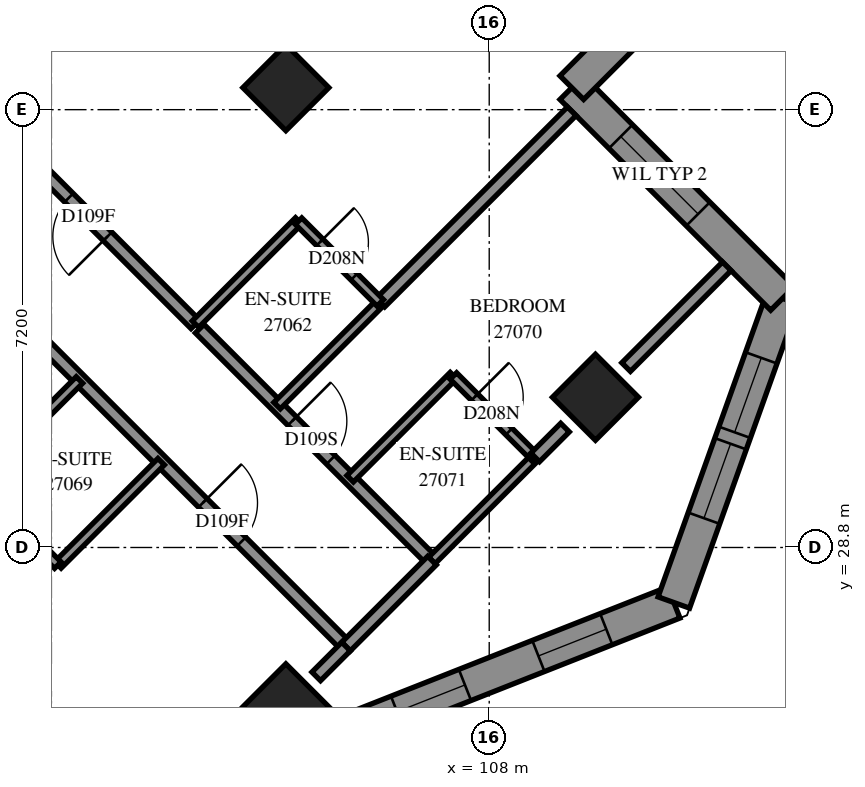
"""IFC4 building model, lengths in metres.
Left out: names, types, materials, properties, quantities, classifications, styles, units other than length and angle.
Written with IfcOpenShell. Run it as: python <this file> out.ifc"""

import sys

from ifc_helpers import new_model, si_unit, direction, frame, frame_2d, origin, origin_2d, place, context, subcontext, project, spatial, polyline, rectangle, outline, extrude, element, fill, save


model = new_model("IFC4")
c1 = context("Model", 3, precision=1e-05, world=origin(), true_north=direction((0.0, 1.0)))
c2 = subcontext(c1, "Body", "Model", "MODEL_VIEW")
j1 = project(units=[si_unit("LENGTHUNIT", "METRE"), si_unit("PLANEANGLEUNIT", "RADIAN")], contexts=[c1])
p1 = place(None, origin())
s1 = spatial("IfcSite", under=j1, at=p1, CompositionType="ELEMENT")
p2 = place(p1, origin())
s2 = spatial("IfcBuilding", under=s1, at=p2, CompositionType="ELEMENT")
p3 = place(p2, frame((0.0, 0.0, 101.6)))
s3 = spatial("IfcBuildingStorey", under=s2, at=p3, CompositionType="ELEMENT", Elevation=101.6)
for number, where, z_axis, x_axis in (
    (1, (104.656, 36.362, 0.0), (0.0, 0.0, 1.0), (0.707, -0.707, 0.0)),
    (2, (109.747, 31.271, 0.0), (0.0, 0.0, 1.0), (0.707, -0.707, 0.0)),
    (3, (104.656, 26.18, 0.0), (0.0, 0.0, 1.0), (0.707, -0.707, 0.0)),
):
    element("IfcColumn", number, at=place(p3, frame(where, z_axis=z_axis, x_axis=x_axis)), inside=s3, PredefinedType="COLUMN", context=c2, shape_type="SweptSolid", body=[
        extrude(rectangle(XDim=1.0, YDim=1.0, at=origin_2d()), origin(), (0.0, 0.0, 1.0), 3.1),
    ])
p4 = place(p3, frame((105.9, 25.867, 0.0), z_axis=(0.0, 0.0, 1.0), x_axis=(0.9301285259, 0.3672341559, 0.0)))
e4 = element("IfcWall", 4, at=p4, inside=s3, PredefinedType="SOLIDWALL", context=c2, shape_type="SweptSolid", body=[
    extrude(outline(polyline([(0.119, -0.275), (5.646, -0.275), (5.397, 0.275), (-0.119, 0.275), (0.119, -0.275)])), origin(), (0.0, 0.0, 1.0), 3.1),
])
p5 = place(p4, frame((0.629, 0.0, 0.5)))
e5 = element("IfcOpeningElement", 5, at=p5, cuts=e4, PredefinedType="OPENING", context=c2, shape_type="SweptSolid", body=[
    extrude(rectangle(XDim=1.2, YDim=2.45, at=frame_2d((0.6, 1.225))), frame((0.0, 0.285, 0.0), z_axis=(0.0, -1.0, 0.0), x_axis=(1.0, 0.0, 0.0)), (0.0, 0.0, 1.0), 0.57),
])
p6 = place(p4, frame((3.127, 0.0, 0.5)))
e6 = element("IfcOpeningElement", 6, at=p6, cuts=e4, PredefinedType="OPENING", context=c2, shape_type="SweptSolid", body=[
    extrude(rectangle(XDim=1.2, YDim=2.45, at=frame_2d((0.6, 1.225))), frame((0.0, 0.285, 0.0), z_axis=(0.0, -1.0, 0.0), x_axis=(1.0, 0.0, 0.0)), (0.0, 0.0, 1.0), 0.57),
])
p7 = place(p3, frame((111.036, 27.895, 0.0), z_axis=(0.0, 0.0, 1.0), x_axis=(0.3366083403, 0.9416447447, 0.0)))
e7 = element("IfcWall", 7, at=p7, inside=s3, PredefinedType="SOLIDWALL", context=c2, shape_type="SweptSolid", body=[
    extrude(outline(polyline([(-0.125, -0.275), (5.485, -0.275), (5.137, 0.275), (0.125, 0.275), (-0.125, -0.275)])), origin(), (0.0, 0.0, 1.0), 3.1),
])
p8 = place(p7, frame((1.472, 0.0, 0.5)))
e8 = element("IfcOpeningElement", 8, at=p8, cuts=e7, PredefinedType="OPENING", context=c2, shape_type="SweptSolid", body=[
    extrude(rectangle(XDim=1.3, YDim=2.45, at=frame_2d((0.65, 1.225))), frame((0.0, 0.285, 0.0), z_axis=(0.0, -1.0, 0.0), x_axis=(1.0, 0.0, 0.0)), (0.0, 0.0, 1.0), 0.57),
])
p9 = place(p7, frame((2.972, 0.0, 0.5)))
e9 = element("IfcOpeningElement", 9, at=p9, cuts=e7, PredefinedType="OPENING", context=c2, shape_type="SweptSolid", body=[
    extrude(rectangle(XDim=1.3, YDim=2.45, at=frame_2d((0.65, 1.225))), frame((0.0, 0.285, 0.0), z_axis=(0.0, -1.0, 0.0), x_axis=(1.0, 0.0, 0.0)), (0.0, 0.0, 1.0), 0.57),
])
p10 = place(p3, frame((112.823, 32.896, 0.0), z_axis=(0.0, 0.0, 1.0), x_axis=(-0.7070965789, 0.7071169833, 0.0)))
e10 = element("IfcWall", 10, at=p10, inside=s3, PredefinedType="SOLIDWALL", context=c2, shape_type="SweptSolid", body=[
    extrude(outline(polyline([(-0.174, -0.275), (4.626, -0.275), (5.176, 0.275), (0.174, 0.275), (-0.174, -0.275)])), origin(), (0.0, 0.0, 1.0), 3.1),
])
p11 = place(p10, frame((1.963, 0.0, 0.6)))
e11 = element("IfcOpeningElement", 11, at=p11, cuts=e10, PredefinedType="OPENING", context=c2, shape_type="SweptSolid", body=[
    extrude(rectangle(XDim=1.8, YDim=1.9, at=frame_2d((0.9, 0.95))), frame((0.0, 0.285, 0.0), z_axis=(0.0, -1.0, 0.0), x_axis=(1.0, 0.0, 0.0)), (0.0, 0.0, 1.0), 0.57),
])
p12 = place(p3, frame((109.358, 36.362, 0.0), z_axis=(0.0, 0.0, 1.0), x_axis=(0.7071067812, 0.7071067812, 0.0)))
e12 = element("IfcWall", 12, at=p12, inside=s3, PredefinedType="SOLIDWALL", context=c2, shape_type="SweptSolid", body=[
    extrude(outline(polyline([(0.275, -0.275), (6.157, -0.275), (5.405, 0.275), (-0.275, 0.275), (0.275, -0.275)])), origin(), (0.0, 0.0, 1.0), 3.1),
])
p13 = place(p12, frame((1.137, 0.0, 0.6)))
e13 = element("IfcOpeningElement", 13, at=p13, cuts=e12, PredefinedType="OPENING", context=c2, shape_type="SweptSolid", body=[
    extrude(rectangle(XDim=1.8, YDim=1.9, at=frame_2d((0.9, 0.95))), frame((0.0, 0.285, 0.0), z_axis=(0.0, -1.0, 0.0), x_axis=(1.0, 0.0, 0.0)), (0.0, 0.0, 1.0), 0.57),
])
p14 = place(p3, frame((92.004, 40.819, 0.0), z_axis=(0.0, 0.0, 1.0), x_axis=(0.7071067812, -0.7071067812, 0.0)))
e14 = element("IfcWall", 14, at=p14, inside=s3, PredefinedType="PARTITIONING", context=c2, shape_type="SweptSolid", body=[
    extrude(rectangle(XDim=19.298, YDim=0.2, at=frame_2d((9.649, 0.0))), origin(), (0.0, 0.0, 1.0), 3.1),
])
p15 = place(p14, frame((3.489, 0.0, 0.0)))
e15 = element("IfcOpeningElement", 15, at=p15, cuts=e14, PredefinedType="OPENING", context=c2, shape_type="SweptSolid", body=[
    extrude(rectangle(XDim=0.9, YDim=2.1, at=frame_2d((0.45, 1.05))), frame((0.0, 0.11, 0.0), z_axis=(0.0, -1.0, 0.0), x_axis=(1.0, 0.0, 0.0)), (0.0, 0.0, 1.0), 0.22),
])
p16 = place(p14, frame((9.319, 0.0, 0.0)))
e16 = element("IfcOpeningElement", 16, at=p16, cuts=e14, PredefinedType="OPENING", context=c2, shape_type="SweptSolid", body=[
    extrude(rectangle(XDim=0.9, YDim=2.1, at=frame_2d((0.45, 1.05))), frame((0.0, 0.11, 0.0), z_axis=(0.0, -1.0, 0.0), x_axis=(1.0, 0.0, 0.0)), (0.0, 0.0, 1.0), 0.22),
])
p17 = place(p14, frame((15.961, 0.0, 0.0)))
e17 = element("IfcOpeningElement", 17, at=p17, cuts=e14, PredefinedType="OPENING", context=c2, shape_type="SweptSolid", body=[
    extrude(rectangle(XDim=0.9, YDim=2.1, at=frame_2d((0.45, 1.05))), frame((0.0, 0.11, 0.0), z_axis=(0.0, -1.0, 0.0), x_axis=(1.0, 0.0, 0.0)), (0.0, 0.0, 1.0), 0.22),
])
p18 = place(p3, frame((99.423, 36.221, 0.0), z_axis=(0.0, 0.0, 1.0), x_axis=(0.7071067812, 0.7071067812, 0.0)))
e18 = element("IfcWall", 18, at=p18, inside=s3, PredefinedType="PARTITIONING", context=c2, shape_type="SweptSolid", body=[
    extrude(rectangle(XDim=12.072, YDim=0.2, at=frame_2d((6.036, 0.0))), origin(), (0.0, 0.0, 1.0), 3.1),
])
p19 = place(p3, frame((103.239, 32.399, 0.0), z_axis=(0.0, 0.0, 1.0), x_axis=(0.7071067812, -0.7071067812, 0.0)))
e19 = element("IfcWall", 19, at=p19, inside=s3, PredefinedType="PARTITIONING", context=c2, shape_type="SweptSolid", body=[
    extrude(rectangle(XDim=5.399, YDim=0.2, at=frame_2d((2.7, 0.0))), origin(), (0.0, 0.0, 1.0), 3.1),
])
p20 = place(p19, frame((2.15, 0.0, 0.0)))
e20 = element("IfcOpeningElement", 20, at=p20, cuts=e19, PredefinedType="OPENING", context=c2, shape_type="SweptSolid", body=[
    extrude(rectangle(XDim=0.9, YDim=2.1, at=frame_2d((0.45, 1.05))), frame((0.0, 0.11, 0.0), z_axis=(0.0, -1.0, 0.0), x_axis=(1.0, 0.0, 0.0)), (0.0, 0.0, 1.0), 0.22),
])
p21 = place(p3, frame((103.168, 32.47, 0.0), z_axis=(0.0, 0.0, 1.0), x_axis=(-0.7067858967, 0.7074275201, 0.0)))
e21 = element("IfcWall", 21, at=p21, inside=s3, PredefinedType="PARTITIONING", context=c2, shape_type="SweptSolid", body=[
    extrude(rectangle(XDim=5.299, YDim=0.2, at=frame_2d((2.65, 0.0))), origin(), (0.0, 0.0, 1.0), 3.1),
])
p22 = place(p21, frame((2.043, 0.0, 0.0)))
e22 = element("IfcOpeningElement", 22, at=p22, cuts=e21, PredefinedType="OPENING", context=c2, shape_type="SweptSolid", body=[
    extrude(rectangle(XDim=0.9, YDim=2.1, at=frame_2d((0.45, 1.05))), frame((0.0, 0.11, 0.0), z_axis=(0.0, -1.0, 0.0), x_axis=(1.0, 0.0, 0.0)), (0.0, 0.0, 1.0), 0.22),
])
p23 = place(p3, frame((106.211, 32.827, 0.0), z_axis=(0.0, 0.0, 1.0), x_axis=(0.7071067812, 0.7071067812, 0.0)))
e23 = element("IfcWall", 23, at=p23, inside=s3, PredefinedType="PARTITIONING", context=c2, shape_type="SweptSolid", body=[
    extrude(rectangle(XDim=4.45, YDim=0.2, at=frame_2d((2.225, 0.0))), origin(), (0.0, 0.0, 1.0), 3.1),
])
for number, where, z_axis, x_axis in (
    (24, (103.169, 32.473, 0.0), (0.0, 0.0, 1.0), (0.707, 0.707, 0.0)),
    (25, (99.563, 29.857, 0.0), (0.0, 0.0, 1.0), (0.707, 0.707, 0.0)),
    (26, (100.907, 28.513, 0.0), (0.0, 0.0, 1.0), (0.707, 0.707, 0.0)),
):
    element("IfcWall", number, at=place(p3, frame(where, z_axis=z_axis, x_axis=x_axis)), inside=s3, PredefinedType="PARTITIONING", context=c2, shape_type="SweptSolid", body=[
        extrude(rectangle(XDim=2.401, YDim=0.15, at=frame_2d((1.201, 0.0))), origin(), (0.0, 0.0, 1.0), 3.1),
    ])
for number, where, z_axis, x_axis in (
    (27, (104.511, 31.133, 0.0), (0.0, 0.0, 1.0), (0.708, 0.707, 0.0)),
    (28, (105.713, 29.931, 0.0), (0.0, 0.0, 1.0), (0.708, 0.707, 0.0)),
):
    element("IfcWall", number, at=place(p3, frame(where, z_axis=z_axis, x_axis=x_axis)), inside=s3, PredefinedType="PARTITIONING", context=c2, shape_type="SweptSolid", body=[
        extrude(rectangle(XDim=2.4, YDim=0.15, at=frame_2d((1.2, 0.0))), origin(), (0.0, 0.0, 1.0), 3.1),
    ])
p24 = place(p3, frame((107.057, 28.587, 0.0), z_axis=(0.0, 0.0, 1.0), x_axis=(0.7075233388, 0.706689978, 0.0)))
e29 = element("IfcWall", 29, at=p24, inside=s3, PredefinedType="PARTITIONING", context=c2, shape_type="SweptSolid", body=[
    extrude(rectangle(XDim=2.4, YDim=0.15, at=frame_2d((1.2, 0.0))), origin(), (0.0, 0.0, 1.0), 2.6),
])
p25 = place(p3, frame((110.251, 31.767, 0.0), z_axis=(0.0, 0.0, 1.0), x_axis=(0.7066584143, 0.7075548639, 0.0)))
e30 = element("IfcWall", 30, at=p25, inside=s3, PredefinedType="PARTITIONING", context=c2, shape_type="SweptSolid", body=[
    extrude(rectangle(XDim=2.343, YDim=0.2, at=frame_2d((1.171, 0.0))), origin(), (0.0, 0.0, 1.0), 3.1),
])
p26 = place(p3, frame((105.645, 27.171, 0.0), z_axis=(0.0, 0.0, 1.0), x_axis=(0.7071067812, 0.7071067812, 0.0)))
e31 = element("IfcWall", 31, at=p26, inside=s3, PredefinedType="PARTITIONING", context=c2, shape_type="SweptSolid", body=[
    extrude(rectangle(XDim=2.0, YDim=0.2, at=frame_2d((1.0, 0.0))), origin(), (0.0, 0.0, 1.0), 2.6),
])
p27 = place(p3, frame((99.561, 29.853, 0.0), z_axis=(0.0, 0.0, 1.0), x_axis=(0.7071067812, -0.7071067812, 0.0)))
e32 = element("IfcWall", 32, at=p27, inside=s3, PredefinedType="PARTITIONING", context=c2, shape_type="SweptSolid", body=[
    extrude(rectangle(XDim=1.901, YDim=0.15, at=frame_2d((0.95, 0.0))), origin(), (0.0, 0.0, 1.0), 3.1),
])
p28 = place(p27, frame((0.519, 0.0, 0.0)))
e33 = element("IfcOpeningElement", 33, at=p28, cuts=e32, PredefinedType="OPENING", context=c2, shape_type="SweptSolid", body=[
    extrude(rectangle(XDim=0.8, YDim=2.1, at=frame_2d((0.4, 1.05))), frame((0.0, 0.085, 0.0), z_axis=(0.0, -1.0, 0.0), x_axis=(1.0, 0.0, 0.0)), (0.0, 0.0, 1.0), 0.17),
])
p29 = place(p3, frame((107.411, 31.621, 0.0), z_axis=(0.0, 0.0, 1.0), x_axis=(0.7071067812, -0.7071067812, 0.0)))
e34 = element("IfcWall", 34, at=p29, inside=s3, PredefinedType="PARTITIONING", context=c2, shape_type="SweptSolid", body=[
    extrude(rectangle(XDim=1.901, YDim=0.15, at=frame_2d((0.95, 0.0))), origin(), (0.0, 0.0, 1.0), 3.1),
])
p30 = place(p29, frame((0.493, 0.0, 0.0)))
e35 = element("IfcOpeningElement", 35, at=p30, cuts=e34, PredefinedType="OPENING", context=c2, shape_type="SweptSolid", body=[
    extrude(rectangle(XDim=0.8, YDim=2.1, at=frame_2d((0.4, 1.05))), frame((0.0, 0.085, 0.0), z_axis=(0.0, -1.0, 0.0), x_axis=(1.0, 0.0, 0.0)), (0.0, 0.0, 1.0), 0.17),
])
p31 = place(p3, frame((104.865, 34.167, 0.0), z_axis=(0.0, 0.0, 1.0), x_axis=(0.7071067812, -0.7071067812, 0.0)))
e36 = element("IfcWall", 36, at=p31, inside=s3, PredefinedType="PARTITIONING", context=c2, shape_type="SweptSolid", body=[
    extrude(rectangle(XDim=1.901, YDim=0.15, at=frame_2d((0.95, 0.0))), origin(), (0.0, 0.0, 1.0), 3.1),
])
p32 = place(p31, frame((0.493, 0.0, 0.0)))
e37 = element("IfcOpeningElement", 37, at=p32, cuts=e36, PredefinedType="OPENING", context=c2, shape_type="SweptSolid", body=[
    extrude(rectangle(XDim=0.8, YDim=2.1, at=frame_2d((0.4, 1.05))), frame((0.0, 0.085, 0.0), z_axis=(0.0, -1.0, 0.0), x_axis=(1.0, 0.0, 0.0)), (0.0, 0.0, 1.0), 0.17),
])
for number, where, z_axis, x_axis in (
    (38, (105.155, 26.681, 0.0), (0.0, 0.0, 1.0), (0.707, 0.707, 0.0)),
    (39, (108.756, 30.282, 0.0), (0.0, 0.0, 1.0), (0.707, 0.707, 0.0)),
):
    element("IfcWall", number, at=place(p3, frame(where, z_axis=z_axis, x_axis=x_axis)), inside=s3, PredefinedType="PARTITIONING", context=c2, shape_type="SweptSolid", body=[
        extrude(rectangle(XDim=0.693, YDim=0.2, at=frame_2d((0.346, 0.0))), origin(), (0.0, 0.0, 1.0), 2.6),
    ])
p33 = place(p5, origin())
e40 = element("IfcWindow", 40, at=p33, inside=s3, PartitioningType="SINGLE_PANEL", PredefinedType="WINDOW", context=c2, shape_type="SweptSolid", body=[
    extrude(rectangle(XDim=1.2, YDim=2.45, at=frame_2d((0.6, 1.225))), frame((0.0, 0.155, 0.0), z_axis=(0.0, -1.0, 0.0), x_axis=(1.0, 0.0, 0.0)), (0.0, 0.0, 1.0), 0.06),
])
fill(e5, e40)
p34 = place(p6, origin())
e41 = element("IfcWindow", 41, at=p34, inside=s3, PartitioningType="SINGLE_PANEL", PredefinedType="WINDOW", context=c2, shape_type="SweptSolid", body=[
    extrude(rectangle(XDim=1.2, YDim=2.45, at=frame_2d((0.6, 1.225))), frame((0.0, 0.155, 0.0), z_axis=(0.0, -1.0, 0.0), x_axis=(1.0, 0.0, 0.0)), (0.0, 0.0, 1.0), 0.06),
])
fill(e6, e41)
p35 = place(p8, origin())
e42 = element("IfcWindow", 42, at=p35, inside=s3, PartitioningType="SINGLE_PANEL", PredefinedType="WINDOW", context=c2, shape_type="SweptSolid", body=[
    extrude(rectangle(XDim=1.3, YDim=2.45, at=frame_2d((0.65, 1.225))), frame((0.0, 0.155, 0.0), z_axis=(0.0, -1.0, 0.0), x_axis=(1.0, 0.0, 0.0)), (0.0, 0.0, 1.0), 0.06),
])
fill(e8, e42)
p36 = place(p9, origin())
e43 = element("IfcWindow", 43, at=p36, inside=s3, PartitioningType="SINGLE_PANEL", PredefinedType="WINDOW", context=c2, shape_type="SweptSolid", body=[
    extrude(rectangle(XDim=1.3, YDim=2.45, at=frame_2d((0.65, 1.225))), frame((0.0, 0.155, 0.0), z_axis=(0.0, -1.0, 0.0), x_axis=(1.0, 0.0, 0.0)), (0.0, 0.0, 1.0), 0.06),
])
fill(e9, e43)
p37 = place(p11, origin())
e44 = element("IfcWindow", 44, at=p37, inside=s3, PartitioningType="SINGLE_PANEL", PredefinedType="WINDOW", context=c2, shape_type="SweptSolid", body=[
    extrude(rectangle(XDim=1.8, YDim=1.9, at=frame_2d((0.9, 0.95))), frame((0.0, 0.155, 0.0), z_axis=(0.0, -1.0, 0.0), x_axis=(1.0, 0.0, 0.0)), (0.0, 0.0, 1.0), 0.06),
])
fill(e11, e44)
p38 = place(p22, origin())
e45 = element("IfcDoor", 45, at=p38, inside=s3, OperationType="SINGLE_SWING_RIGHT", PredefinedType="DOOR", context=c2, shape_type="SweptSolid", body=[
    extrude(rectangle(XDim=0.9, YDim=2.1, at=frame_2d((0.45, 1.05))), frame((0.0, 0.025, 0.0), z_axis=(0.0, -1.0, 0.0), x_axis=(1.0, 0.0, 0.0)), (0.0, 0.0, 1.0), 0.05),
])
fill(e22, e45)
p39 = place(p32, origin())
e46 = element("IfcDoor", 46, at=p39, inside=s3, OperationType="SINGLE_SWING_RIGHT", PredefinedType="DOOR", context=c2, shape_type="SweptSolid", body=[
    extrude(rectangle(XDim=0.8, YDim=2.1, at=frame_2d((0.4, 1.05))), frame((0.0, 0.025, 0.0), z_axis=(0.0, -1.0, 0.0), x_axis=(1.0, 0.0, 0.0)), (0.0, 0.0, 1.0), 0.05),
])
fill(e37, e46)
p40 = place(p17, origin())
e47 = element("IfcDoor", 47, at=p40, inside=s3, OperationType="SINGLE_SWING_RIGHT", PredefinedType="DOOR", context=c2, shape_type="SweptSolid", body=[
    extrude(rectangle(XDim=0.9, YDim=2.1, at=frame_2d((0.45, 1.05))), frame((0.0, 0.025, 0.0), z_axis=(0.0, -1.0, 0.0), x_axis=(1.0, 0.0, 0.0)), (0.0, 0.0, 1.0), 0.05),
])
fill(e17, e47)
p41 = place(p20, origin())
e48 = element("IfcDoor", 48, at=p41, inside=s3, OperationType="SINGLE_SWING_RIGHT", PredefinedType="DOOR", context=c2, shape_type="SweptSolid", body=[
    extrude(rectangle(XDim=0.9, YDim=2.1, at=frame_2d((0.45, 1.05))), frame((0.0, 0.025, 0.0), z_axis=(0.0, -1.0, 0.0), x_axis=(1.0, 0.0, 0.0)), (0.0, 0.0, 1.0), 0.05),
])
fill(e20, e48)
p42 = place(p30, origin())
e49 = element("IfcDoor", 49, at=p42, inside=s3, OperationType="SINGLE_SWING_RIGHT", PredefinedType="DOOR", context=c2, shape_type="SweptSolid", body=[
    extrude(rectangle(XDim=0.8, YDim=2.1, at=frame_2d((0.4, 1.05))), frame((0.0, 0.025, 0.0), z_axis=(0.0, -1.0, 0.0), x_axis=(1.0, 0.0, 0.0)), (0.0, 0.0, 1.0), 0.05),
])
fill(e35, e49)
save(model, sys.argv[1])
